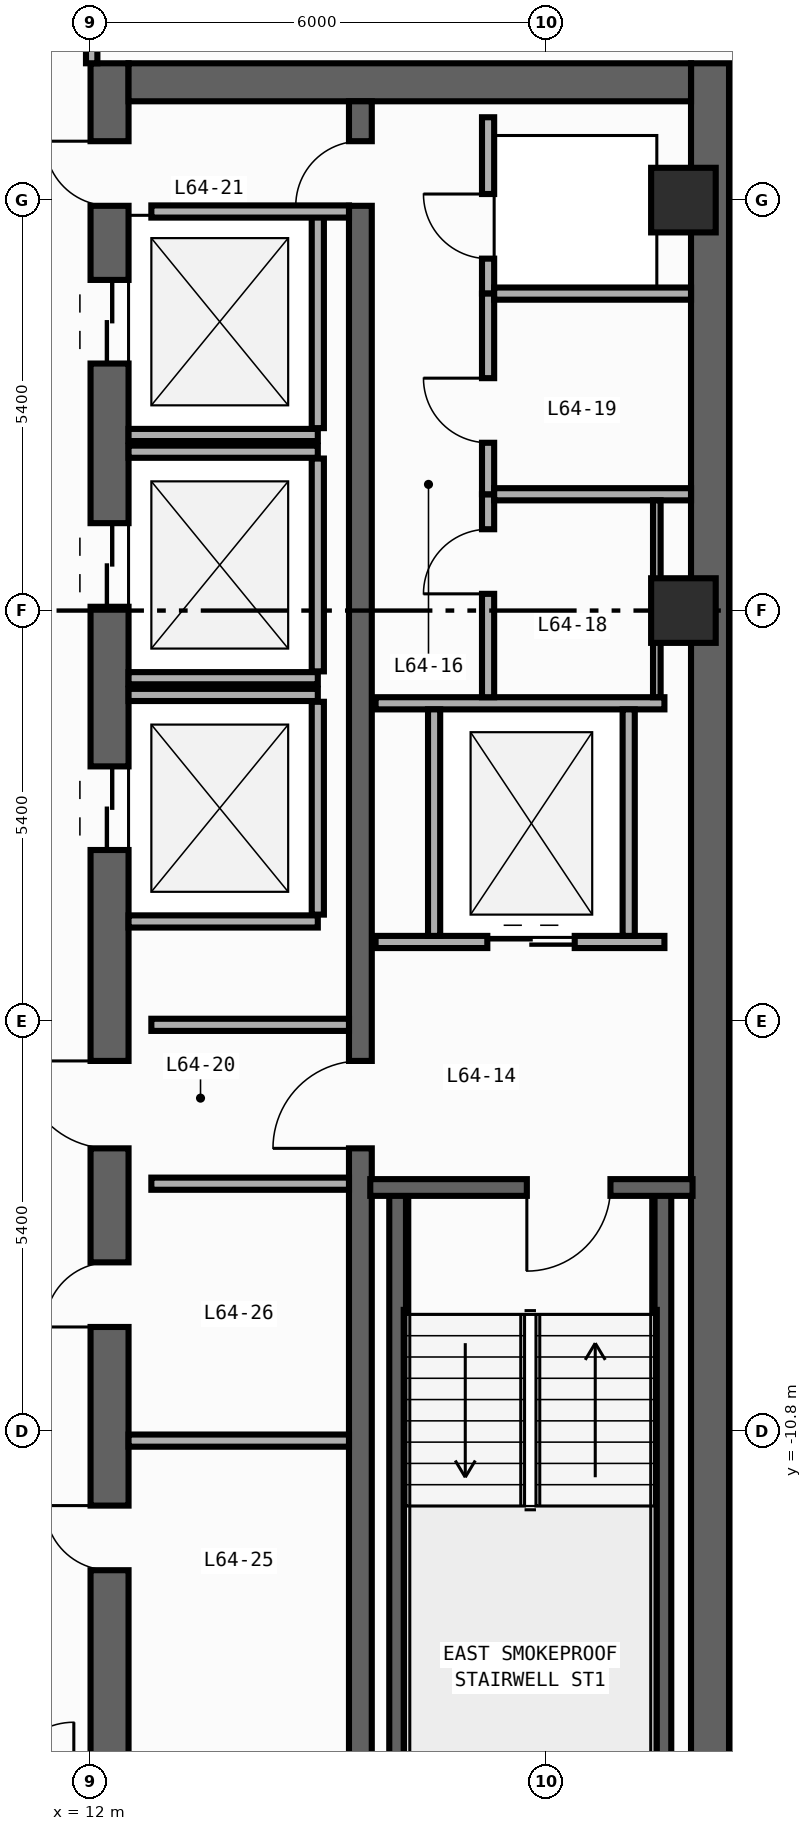
"""IFC4 building model, lengths in metres.
Left out: names, types, materials, properties, quantities, classifications, styles, units other than length and angle.
Written with IfcOpenShell. Run it as: python <this file> out.ifc"""

import sys

from ifc_helpers import new_model, si_unit, direction, frame, frame_2d, origin, origin_2d, place, context, subcontext, project, spatial, rectangle, extrude, element, fill, save


model = new_model("IFC4")
c1 = context("Model", 3, precision=1e-05, world=origin(), true_north=direction((0.0, 1.0)))
c2 = subcontext(c1, "Body", "Model", "MODEL_VIEW")
j1 = project(units=[si_unit("LENGTHUNIT", "METRE"), si_unit("PLANEANGLEUNIT", "RADIAN")], contexts=[c1])
p1 = place(None, origin())
s1 = spatial("IfcSite", under=j1, at=p1, CompositionType="ELEMENT")
p2 = place(p1, origin())
s2 = spatial("IfcBuilding", under=s1, at=p2, CompositionType="ELEMENT")
p3 = place(p2, frame((0.0, 0.0, 269.2)))
s3 = spatial("IfcBuildingStorey", under=s2, at=p3, CompositionType="ELEMENT", Elevation=269.2)
p4 = place(p3, frame((12.25, -19.8, 0.0), z_axis=(0.0, 0.0, 1.0), x_axis=(0.0, 1.0, 0.0)))
e1 = element("IfcWall", 1, at=p4, inside=s3, PredefinedType="SHEAR", context=c2, shape_type="SweptSolid", body=[
    extrude(rectangle(XDim=27.0, YDim=0.5, at=frame_2d((13.5, 0.0))), origin(), (0.0, 0.0, 1.0), 3.25),
])
p5 = place(p4, frame((23.05, 0.0, 0.0)))
e2 = element("IfcOpeningElement", 2, at=p5, cuts=e1, PredefinedType="OPENING", context=c2, shape_type="SweptSolid", body=[
    extrude(rectangle(XDim=1.1, YDim=2.2, at=frame_2d((0.55, 1.1))), frame((0.0, 0.26, 0.0), z_axis=(0.0, -1.0, 0.0), x_axis=(1.0, 0.0, 0.0)), (0.0, 0.0, 1.0), 0.52),
])
p6 = place(p4, frame((19.85, 0.0, 0.0)))
e3 = element("IfcOpeningElement", 3, at=p6, cuts=e1, PredefinedType="OPENING", context=c2, shape_type="SweptSolid", body=[
    extrude(rectangle(XDim=1.1, YDim=2.2, at=frame_2d((0.55, 1.1))), frame((0.0, 0.26, 0.0), z_axis=(0.0, -1.0, 0.0), x_axis=(1.0, 0.0, 0.0)), (0.0, 0.0, 1.0), 0.52),
])
p7 = place(p4, frame((16.65, 0.0, 0.0)))
e4 = element("IfcOpeningElement", 4, at=p7, cuts=e1, PredefinedType="OPENING", context=c2, shape_type="SweptSolid", body=[
    extrude(rectangle(XDim=1.1, YDim=2.2, at=frame_2d((0.55, 1.1))), frame((0.0, 0.26, 0.0), z_axis=(0.0, -1.0, 0.0), x_axis=(1.0, 0.0, 0.0)), (0.0, 0.0, 1.0), 0.52),
])
p8 = place(p4, frame((7.175, 0.0, 0.0)))
e5 = element("IfcOpeningElement", 5, at=p8, cuts=e1, PredefinedType="OPENING", context=c2, shape_type="SweptSolid", body=[
    extrude(rectangle(XDim=0.85, YDim=2.1, at=frame_2d((0.425, 1.05))), frame((0.0, 0.26, 0.0), z_axis=(0.0, -1.0, 0.0), x_axis=(1.0, 0.0, 0.0)), (0.0, 0.0, 1.0), 0.52),
])
p9 = place(p4, frame((10.375, 0.0, 0.0)))
e6 = element("IfcOpeningElement", 6, at=p9, cuts=e1, PredefinedType="OPENING", context=c2, shape_type="SweptSolid", body=[
    extrude(rectangle(XDim=0.85, YDim=2.1, at=frame_2d((0.425, 1.05))), frame((0.0, 0.26, 0.0), z_axis=(0.0, -1.0, 0.0), x_axis=(1.0, 0.0, 0.0)), (0.0, 0.0, 1.0), 0.52),
])
p10 = place(p4, frame((12.725, 0.0, 0.0)))
e7 = element("IfcOpeningElement", 7, at=p10, cuts=e1, PredefinedType="OPENING", context=c2, shape_type="SweptSolid", body=[
    extrude(rectangle(XDim=1.15, YDim=2.2, at=frame_2d((0.575, 1.1))), frame((0.0, 0.26, 0.0), z_axis=(0.0, -1.0, 0.0), x_axis=(1.0, 0.0, 0.0)), (0.0, 0.0, 1.0), 0.52),
])
p11 = place(p4, frame((25.125, 0.0, 0.0)))
e8 = element("IfcOpeningElement", 8, at=p11, cuts=e1, PredefinedType="OPENING", context=c2, shape_type="SweptSolid", body=[
    extrude(rectangle(XDim=0.85, YDim=2.1, at=frame_2d((0.425, 1.05))), frame((0.0, 0.26, 0.0), z_axis=(0.0, -1.0, 0.0), x_axis=(1.0, 0.0, 0.0)), (0.0, 0.0, 1.0), 0.52),
])
p12 = place(p3, frame((20.15, -19.8, 0.0), z_axis=(0.0, 0.0, 1.0), x_axis=(0.0, 1.0, 0.0)))
e9 = element("IfcWall", 9, at=p12, inside=s3, PredefinedType="SHEAR", context=c2, shape_type="SweptSolid", body=[
    extrude(rectangle(XDim=27.0, YDim=0.5, at=frame_2d((13.5, 0.0))), origin(), (0.0, 0.0, 1.0), 3.25),
])
p13 = place(p3, frame((12.5, 6.95, 0.0), z_axis=(0.0, 0.0, 1.0), x_axis=(1.0, 0.0, 0.0)))
e10 = element("IfcWall", 10, at=p13, inside=s3, PredefinedType="SHEAR", context=c2, shape_type="SweptSolid", body=[
    extrude(rectangle(XDim=7.4, YDim=0.5, at=frame_2d((3.7, 0.0))), origin(), (0.0, 0.0, 1.0), 3.25),
])
p14 = place(p3, frame((15.55, -19.3, 0.0), z_axis=(0.0, 0.0, 1.0), x_axis=(0.0, 1.0, 0.0)))
e11 = element("IfcWall", 11, at=p14, inside=s3, PredefinedType="SHEAR", context=c2, shape_type="SweptSolid", body=[
    extrude(rectangle(XDim=26.0, YDim=0.3, at=frame_2d((13.0, 0.0))), origin(), (0.0, 0.0, 1.0), 3.25),
])
p15 = place(p14, frame((12.225, 0.0, 0.0)))
e12 = element("IfcOpeningElement", 12, at=p15, cuts=e11, PredefinedType="OPENING", context=c2, shape_type="SweptSolid", body=[
    extrude(rectangle(XDim=1.15, YDim=2.2, at=frame_2d((0.575, 1.1))), frame((0.0, 0.16, 0.0), z_axis=(0.0, -1.0, 0.0), x_axis=(1.0, 0.0, 0.0)), (0.0, 0.0, 1.0), 0.32),
])
p16 = place(p14, frame((24.625, 0.0, 0.0)))
e13 = element("IfcOpeningElement", 13, at=p16, cuts=e11, PredefinedType="OPENING", context=c2, shape_type="SweptSolid", body=[
    extrude(rectangle(XDim=0.85, YDim=2.1, at=frame_2d((0.425, 1.05))), frame((0.0, 0.16, 0.0), z_axis=(0.0, -1.0, 0.0), x_axis=(1.0, 0.0, 0.0)), (0.0, 0.0, 1.0), 0.32),
])
for number, where, z_axis, x_axis in (
    (14, (16.04, -19.01, 0.0), (0.0, 0.0, 1.0), (0.0, 1.0, 0.0)),
    (15, (19.53, -19.01, 0.0), (0.0, 0.0, 1.0), (0.0, 1.0, 0.0)),
):
    element("IfcWall", number, at=place(p3, frame(where, z_axis=z_axis, x_axis=x_axis)), inside=s3, PredefinedType="SHEAR", context=c2, shape_type="SweptSolid", body=[
        extrude(rectangle(XDim=11.42, YDim=0.22, at=frame_2d((5.71, 0.0))), origin(), (0.0, 0.0, 1.0), 3.25),
    ])
p17 = place(p3, frame((19.92, -7.59, 0.0), z_axis=(0.0, 0.0, 1.0), x_axis=(-1.0, 0.0, 0.0)))
e16 = element("IfcWall", 16, at=p17, inside=s3, PredefinedType="SHEAR", context=c2, shape_type="SweptSolid", body=[
    extrude(rectangle(XDim=4.24, YDim=0.22, at=frame_2d((2.12, 0.0))), origin(), (0.0, 0.0, 1.0), 3.25),
])
p18 = place(p17, frame((1.08, 0.0, 0.0)))
e17 = element("IfcOpeningElement", 17, at=p18, cuts=e16, PredefinedType="OPENING", context=c2, shape_type="SweptSolid", body=[
    extrude(rectangle(XDim=1.1, YDim=2.2, at=frame_2d((0.55, 1.1))), frame((0.0, 0.12, 0.0), z_axis=(0.0, -1.0, 0.0), x_axis=(1.0, 0.0, 0.0)), (0.0, 0.0, 1.0), 0.24),
])
for number, where, z_axis, x_axis in (
    (18, (19.8, 0.0, 0.0), (0.0, 0.0, 1.0), (1.0, 0.0, 0.0)),
    (19, (19.8, 5.4, 0.0), (0.0, 0.0, 1.0), (1.0, 0.0, 0.0)),
):
    element("IfcColumn", number, at=place(p3, frame(where, z_axis=z_axis, x_axis=x_axis)), inside=s3, PredefinedType="COLUMN", context=c2, shape_type="SweptSolid", body=[
        extrude(rectangle(XDim=0.85, YDim=0.85, at=origin_2d()), origin(), (0.0, 0.0, 1.0), 3.6),
    ])
p19 = place(p3, frame((12.5, 2.31, 0.0), z_axis=(0.0, 0.0, 1.0), x_axis=(1.0, 0.0, 0.0)))
e20 = element("IfcWall", 20, at=p19, inside=s3, PredefinedType="STANDARD", context=c2, shape_type="SweptSolid", body=[
    extrude(rectangle(XDim=2.49, YDim=0.16, at=frame_2d((1.245, 0.0))), origin(), (0.0, 0.0, 1.0), 3.25),
])
p20 = place(p3, frame((14.99, 2.4, 0.0), z_axis=(0.0, 0.0, 1.0), x_axis=(0.0, 1.0, 0.0)))
e21 = element("IfcWall", 21, at=p20, inside=s3, PredefinedType="STANDARD", context=c2, shape_type="SweptSolid", body=[
    extrude(rectangle(XDim=2.8, YDim=0.16, at=frame_2d((1.4, 0.0))), origin(), (0.0, 0.0, 1.0), 3.25),
])
for number, where, z_axis, x_axis in (
    (22, (12.5, -0.89, 0.0), (0.0, 0.0, 1.0), (1.0, 0.0, 0.0)),
    (23, (12.5, 2.09, 0.0), (0.0, 0.0, 1.0), (1.0, 0.0, 0.0)),
):
    element("IfcWall", number, at=place(p3, frame(where, z_axis=z_axis, x_axis=x_axis)), inside=s3, PredefinedType="STANDARD", context=c2, shape_type="SweptSolid", body=[
        extrude(rectangle(XDim=2.49, YDim=0.16, at=frame_2d((1.245, 0.0))), origin(), (0.0, 0.0, 1.0), 3.25),
    ])
p21 = place(p3, frame((14.99, -0.8, 0.0), z_axis=(0.0, 0.0, 1.0), x_axis=(0.0, 1.0, 0.0)))
e24 = element("IfcWall", 24, at=p21, inside=s3, PredefinedType="STANDARD", context=c2, shape_type="SweptSolid", body=[
    extrude(rectangle(XDim=2.8, YDim=0.16, at=frame_2d((1.4, 0.0))), origin(), (0.0, 0.0, 1.0), 3.25),
])
for number, where, z_axis, x_axis in (
    (25, (12.5, -4.09, 0.0), (0.0, 0.0, 1.0), (1.0, 0.0, 0.0)),
    (26, (12.5, -1.11, 0.0), (0.0, 0.0, 1.0), (1.0, 0.0, 0.0)),
):
    element("IfcWall", number, at=place(p3, frame(where, z_axis=z_axis, x_axis=x_axis)), inside=s3, PredefinedType="STANDARD", context=c2, shape_type="SweptSolid", body=[
        extrude(rectangle(XDim=2.49, YDim=0.16, at=frame_2d((1.245, 0.0))), origin(), (0.0, 0.0, 1.0), 3.25),
    ])
p22 = place(p3, frame((14.99, -4.0, 0.0), z_axis=(0.0, 0.0, 1.0), x_axis=(0.0, 1.0, 0.0)))
e27 = element("IfcWall", 27, at=p22, inside=s3, PredefinedType="STANDARD", context=c2, shape_type="SweptSolid", body=[
    extrude(rectangle(XDim=2.8, YDim=0.16, at=frame_2d((1.4, 0.0))), origin(), (0.0, 0.0, 1.0), 3.25),
])
p23 = place(p3, frame((15.75, -4.36, 0.0), z_axis=(0.0, 0.0, 1.0), x_axis=(1.0, 0.0, 0.0)))
e28 = element("IfcWall", 28, at=p23, inside=s3, PredefinedType="STANDARD", context=c2, shape_type="SweptSolid", body=[
    extrude(rectangle(XDim=3.8, YDim=0.16, at=frame_2d((1.9, 0.0))), origin(), (0.0, 0.0, 1.0), 3.25),
])
p24 = place(p23, frame((1.47, 0.0, 0.0)))
e29 = element("IfcOpeningElement", 29, at=p24, cuts=e28, PredefinedType="OPENING", context=c2, shape_type="SweptSolid", body=[
    extrude(rectangle(XDim=1.15, YDim=2.2, at=frame_2d((0.575, 1.1))), frame((0.0, 0.09, 0.0), z_axis=(0.0, -1.0, 0.0), x_axis=(1.0, 0.0, 0.0)), (0.0, 0.0, 1.0), 0.18),
])
p25 = place(p3, frame((15.75, -1.22, 0.0), z_axis=(0.0, 0.0, 1.0), x_axis=(1.0, 0.0, 0.0)))
e30 = element("IfcWall", 30, at=p25, inside=s3, PredefinedType="STANDARD", context=c2, shape_type="SweptSolid", body=[
    extrude(rectangle(XDim=3.8, YDim=0.16, at=frame_2d((1.9, 0.0))), origin(), (0.0, 0.0, 1.0), 3.25),
])
for number, where, z_axis, x_axis in (
    (31, (16.52, -4.28, 0.0), (0.0, 0.0, 1.0), (0.0, 1.0, 0.0)),
    (32, (19.08, -4.28, 0.0), (0.0, 0.0, 1.0), (0.0, 1.0, 0.0)),
):
    element("IfcWall", number, at=place(p3, frame(where, z_axis=z_axis, x_axis=x_axis)), inside=s3, PredefinedType="STANDARD", context=c2, shape_type="SweptSolid", body=[
        extrude(rectangle(XDim=2.98, YDim=0.16, at=frame_2d((1.49, 0.0))), origin(), (0.0, 0.0, 1.0), 3.25),
    ])
for number, where, z_axis, x_axis in (
    (33, (12.8, -5.45, 0.0), (0.0, 0.0, 1.0), (1.0, 0.0, 0.0)),
    (34, (12.8, -7.54, 0.0), (0.0, 0.0, 1.0), (1.0, 0.0, 0.0)),
    (35, (12.8, 5.25, 0.0), (0.0, 0.0, 1.0), (1.0, 0.0, 0.0)),
):
    element("IfcWall", number, at=place(p3, frame(where, z_axis=z_axis, x_axis=x_axis)), inside=s3, PredefinedType="STANDARD", context=c2, shape_type="SweptSolid", body=[
        extrude(rectangle(XDim=2.6, YDim=0.16, at=frame_2d((1.3, 0.0))), origin(), (0.0, 0.0, 1.0), 3.25),
    ])
p26 = place(p3, frame((17.23, 4.17, 0.0), z_axis=(0.0, 0.0, 1.0), x_axis=(0.0, 1.0, 0.0)))
e36 = element("IfcWall", 36, at=p26, inside=s3, PredefinedType="PARTITIONING", context=c2, shape_type="SweptSolid", body=[
    extrude(rectangle(XDim=2.32, YDim=0.16, at=frame_2d((1.16, 0.0))), origin(), (0.0, 0.0, 1.0), 3.25),
])
p27 = place(p26, frame((0.46, 0.0, 0.0)))
e37 = element("IfcOpeningElement", 37, at=p27, cuts=e36, PredefinedType="OPENING", context=c2, shape_type="SweptSolid", body=[
    extrude(rectangle(XDim=0.85, YDim=2.1, at=frame_2d((0.425, 1.05))), frame((0.0, 0.09, 0.0), z_axis=(0.0, -1.0, 0.0), x_axis=(1.0, 0.0, 0.0)), (0.0, 0.0, 1.0), 0.18),
])
p28 = place(p3, frame((17.23, -1.14, 0.0), z_axis=(0.0, 0.0, 1.0), x_axis=(0.0, 1.0, 0.0)))
e38 = element("IfcWall", 38, at=p28, inside=s3, PredefinedType="PARTITIONING", context=c2, shape_type="SweptSolid", body=[
    extrude(rectangle(XDim=2.67, YDim=0.16, at=frame_2d((1.335, 0.0))), origin(), (0.0, 0.0, 1.0), 3.25),
])
p29 = place(p28, frame((1.36, 0.0, 0.0)))
e39 = element("IfcOpeningElement", 39, at=p29, cuts=e38, PredefinedType="OPENING", context=c2, shape_type="SweptSolid", body=[
    extrude(rectangle(XDim=0.85, YDim=2.1, at=frame_2d((0.425, 1.05))), frame((0.0, 0.09, 0.0), z_axis=(0.0, -1.0, 0.0), x_axis=(1.0, 0.0, 0.0)), (0.0, 0.0, 1.0), 0.18),
])
p30 = place(p3, frame((17.23, 1.53, 0.0), z_axis=(0.0, 0.0, 1.0), x_axis=(0.0, 1.0, 0.0)))
e40 = element("IfcWall", 40, at=p30, inside=s3, PredefinedType="PARTITIONING", context=c2, shape_type="SweptSolid", body=[
    extrude(rectangle(XDim=2.64, YDim=0.16, at=frame_2d((1.32, 0.0))), origin(), (0.0, 0.0, 1.0), 3.25),
])
p31 = place(p30, frame((0.677, 0.0, 0.0)))
e41 = element("IfcOpeningElement", 41, at=p31, cuts=e40, PredefinedType="OPENING", context=c2, shape_type="SweptSolid", body=[
    extrude(rectangle(XDim=0.85, YDim=2.1, at=frame_2d((0.425, 1.05))), frame((0.0, 0.09, 0.0), z_axis=(0.0, -1.0, 0.0), x_axis=(1.0, 0.0, 0.0)), (0.0, 0.0, 1.0), 0.18),
])
for number, where, z_axis, x_axis in (
    (42, (17.31, 4.17, 0.0), (0.0, 0.0, 1.0), (1.0, 0.0, 0.0)),
    (43, (17.31, 1.53, 0.0), (0.0, 0.0, 1.0), (1.0, 0.0, 0.0)),
):
    element("IfcWall", number, at=place(p3, frame(where, z_axis=z_axis, x_axis=x_axis)), inside=s3, PredefinedType="PARTITIONING", context=c2, shape_type="SweptSolid", body=[
        extrude(rectangle(XDim=2.59, YDim=0.16, at=frame_2d((1.295, 0.0))), origin(), (0.0, 0.0, 1.0), 3.25),
    ])
p32 = place(p3, frame((12.5, -10.92, 0.0), z_axis=(0.0, 0.0, 1.0), x_axis=(1.0, 0.0, 0.0)))
e44 = element("IfcWall", 44, at=p32, inside=s3, PredefinedType="PARTITIONING", context=c2, shape_type="SweptSolid", body=[
    extrude(rectangle(XDim=2.9, YDim=0.16, at=frame_2d((1.45, 0.0))), origin(), (0.0, 0.0, 1.0), 2.35),
])
p33 = place(p3, frame((12.015, 7.2, 0.0), z_axis=(0.0, 0.0, 1.0), x_axis=(0.0, 1.0, 0.0)))
e45 = element("IfcWall", 45, at=p33, inside=s3, PredefinedType="PARTITIONING", context=c2, shape_type="SweptSolid", body=[
    extrude(rectangle(XDim=6.52, YDim=0.15, at=frame_2d((3.26, 0.0))), origin(), (0.0, 0.0, 1.0), 3.25),
])
p34 = place(p33, frame((0.67, 0.0, 0.0)))
e46 = element("IfcOpeningElement", 46, at=p34, cuts=e45, PredefinedType="OPENING", context=c2, shape_type="SweptSolid", body=[
    extrude(rectangle(XDim=0.9, YDim=2.15, at=frame_2d((0.45, 1.075))), frame((0.0, 0.085, 0.0), z_axis=(0.0, -1.0, 0.0), x_axis=(1.0, 0.0, 0.0)), (0.0, 0.0, 1.0), 0.17),
])
p35 = place(p3, frame((19.45, 1.45, 0.0), z_axis=(0.0, 0.0, 1.0), x_axis=(0.0, -1.0, 0.0)))
e47 = element("IfcWall", 47, at=p35, inside=s3, PredefinedType="PARTITIONING", context=c2, shape_type="SweptSolid", body=[
    extrude(rectangle(XDim=2.59, YDim=0.1, at=frame_2d((1.295, 0.0))), origin(), (0.0, 0.0, 1.0), 3.25),
])
p36 = place(p18, origin())
e48 = element("IfcDoor", 48, at=p36, inside=s3, OperationType="SINGLE_SWING_RIGHT", PredefinedType="DOOR", context=c2, shape_type="SweptSolid", body=[
    extrude(rectangle(XDim=1.1, YDim=2.2, at=frame_2d((0.55, 1.1))), frame((0.0, 0.025, 0.0), z_axis=(0.0, -1.0, 0.0), x_axis=(1.0, 0.0, 0.0)), (0.0, 0.0, 1.0), 0.05),
])
fill(e17, e48)
p37 = place(p5, origin())
e49 = element("IfcDoor", 49, at=p37, inside=s3, OperationType="DOUBLE_DOOR_SLIDING", PredefinedType="DOOR", context=c2, shape_type="SweptSolid", body=[
    extrude(rectangle(XDim=1.1, YDim=2.2, at=frame_2d((0.55, 1.1))), frame((0.0, 0.025, 0.0), z_axis=(0.0, -1.0, 0.0), x_axis=(1.0, 0.0, 0.0)), (0.0, 0.0, 1.0), 0.05),
])
fill(e2, e49)
p38 = place(p6, origin())
e50 = element("IfcDoor", 50, at=p38, inside=s3, OperationType="DOUBLE_DOOR_SLIDING", PredefinedType="DOOR", context=c2, shape_type="SweptSolid", body=[
    extrude(rectangle(XDim=1.1, YDim=2.2, at=frame_2d((0.55, 1.1))), frame((0.0, 0.025, 0.0), z_axis=(0.0, -1.0, 0.0), x_axis=(1.0, 0.0, 0.0)), (0.0, 0.0, 1.0), 0.05),
])
fill(e3, e50)
p39 = place(p7, origin())
e51 = element("IfcDoor", 51, at=p39, inside=s3, OperationType="DOUBLE_DOOR_SLIDING", PredefinedType="DOOR", context=c2, shape_type="SweptSolid", body=[
    extrude(rectangle(XDim=1.1, YDim=2.2, at=frame_2d((0.55, 1.1))), frame((0.0, 0.025, 0.0), z_axis=(0.0, -1.0, 0.0), x_axis=(1.0, 0.0, 0.0)), (0.0, 0.0, 1.0), 0.05),
])
fill(e4, e51)
p40 = place(p8, origin())
e52 = element("IfcDoor", 52, at=p40, inside=s3, OperationType="SINGLE_SWING_RIGHT", PredefinedType="DOOR", context=c2, shape_type="SweptSolid", body=[
    extrude(rectangle(XDim=0.85, YDim=2.1, at=frame_2d((0.425, 1.05))), frame((0.0, 0.025, 0.0), z_axis=(0.0, -1.0, 0.0), x_axis=(1.0, 0.0, 0.0)), (0.0, 0.0, 1.0), 0.05),
])
fill(e5, e52)
p41 = place(p9, origin())
e53 = element("IfcDoor", 53, at=p41, inside=s3, OperationType="SINGLE_SWING_LEFT", PredefinedType="DOOR", context=c2, shape_type="SweptSolid", body=[
    extrude(rectangle(XDim=0.85, YDim=2.1, at=frame_2d((0.425, 1.05))), frame((0.0, 0.025, 0.0), z_axis=(0.0, -1.0, 0.0), x_axis=(1.0, 0.0, 0.0)), (0.0, 0.0, 1.0), 0.05),
])
fill(e6, e53)
p42 = place(p10, origin())
e54 = element("IfcDoor", 54, at=p42, inside=s3, OperationType="SINGLE_SWING_RIGHT", PredefinedType="DOOR", context=c2, shape_type="SweptSolid", body=[
    extrude(rectangle(XDim=1.15, YDim=2.2, at=frame_2d((0.575, 1.1))), frame((0.0, 0.025, 0.0), z_axis=(0.0, -1.0, 0.0), x_axis=(1.0, 0.0, 0.0)), (0.0, 0.0, 1.0), 0.05),
])
fill(e7, e54)
p43 = place(p15, origin())
e55 = element("IfcDoor", 55, at=p43, inside=s3, OperationType="SINGLE_SWING_LEFT", PredefinedType="DOOR", context=c2, shape_type="SweptSolid", body=[
    extrude(rectangle(XDim=1.15, YDim=2.2, at=frame_2d((0.575, 1.1))), frame((0.0, 0.025, 0.0), z_axis=(0.0, -1.0, 0.0), x_axis=(1.0, 0.0, 0.0)), (0.0, 0.0, 1.0), 0.05),
])
fill(e12, e55)
p44 = place(p11, origin())
e56 = element("IfcDoor", 56, at=p44, inside=s3, OperationType="SINGLE_SWING_RIGHT", PredefinedType="DOOR", context=c2, shape_type="SweptSolid", body=[
    extrude(rectangle(XDim=0.85, YDim=2.1, at=frame_2d((0.425, 1.05))), frame((0.0, 0.025, 0.0), z_axis=(0.0, -1.0, 0.0), x_axis=(1.0, 0.0, 0.0)), (0.0, 0.0, 1.0), 0.05),
])
fill(e8, e56)
p45 = place(p16, origin())
e57 = element("IfcDoor", 57, at=p45, inside=s3, OperationType="SINGLE_SWING_LEFT", PredefinedType="DOOR", context=c2, shape_type="SweptSolid", body=[
    extrude(rectangle(XDim=0.85, YDim=2.1, at=frame_2d((0.425, 1.05))), frame((0.0, 0.025, 0.0), z_axis=(0.0, -1.0, 0.0), x_axis=(1.0, 0.0, 0.0)), (0.0, 0.0, 1.0), 0.05),
])
fill(e13, e57)
p46 = place(p24, origin())
e58 = element("IfcDoor", 58, at=p46, inside=s3, OperationType="DOUBLE_DOOR_SLIDING", PredefinedType="DOOR", context=c2, shape_type="SweptSolid", body=[
    extrude(rectangle(XDim=1.15, YDim=2.2, at=frame_2d((0.575, 1.1))), frame((0.0, 0.025, 0.0), z_axis=(0.0, -1.0, 0.0), x_axis=(1.0, 0.0, 0.0)), (0.0, 0.0, 1.0), 0.05),
])
fill(e29, e58)
p47 = place(p27, origin())
e59 = element("IfcDoor", 59, at=p47, inside=s3, OperationType="SINGLE_SWING_RIGHT", PredefinedType="DOOR", context=c2, shape_type="SweptSolid", body=[
    extrude(rectangle(XDim=0.85, YDim=2.1, at=frame_2d((0.425, 1.05))), frame((0.0, 0.025, 0.0), z_axis=(0.0, -1.0, 0.0), x_axis=(1.0, 0.0, 0.0)), (0.0, 0.0, 1.0), 0.05),
])
fill(e37, e59)
p48 = place(p29, origin())
e60 = element("IfcDoor", 60, at=p48, inside=s3, OperationType="SINGLE_SWING_LEFT", PredefinedType="DOOR", context=c2, shape_type="SweptSolid", body=[
    extrude(rectangle(XDim=0.85, YDim=2.1, at=frame_2d((0.425, 1.05))), frame((0.0, 0.025, 0.0), z_axis=(0.0, -1.0, 0.0), x_axis=(1.0, 0.0, 0.0)), (0.0, 0.0, 1.0), 0.05),
])
fill(e39, e60)
p49 = place(p31, origin())
e61 = element("IfcDoor", 61, at=p49, inside=s3, OperationType="SINGLE_SWING_RIGHT", PredefinedType="DOOR", context=c2, shape_type="SweptSolid", body=[
    extrude(rectangle(XDim=0.85, YDim=2.1, at=frame_2d((0.425, 1.05))), frame((0.0, 0.025, 0.0), z_axis=(0.0, -1.0, 0.0), x_axis=(1.0, 0.0, 0.0)), (0.0, 0.0, 1.0), 0.05),
])
fill(e41, e61)
save(model, sys.argv[1])
